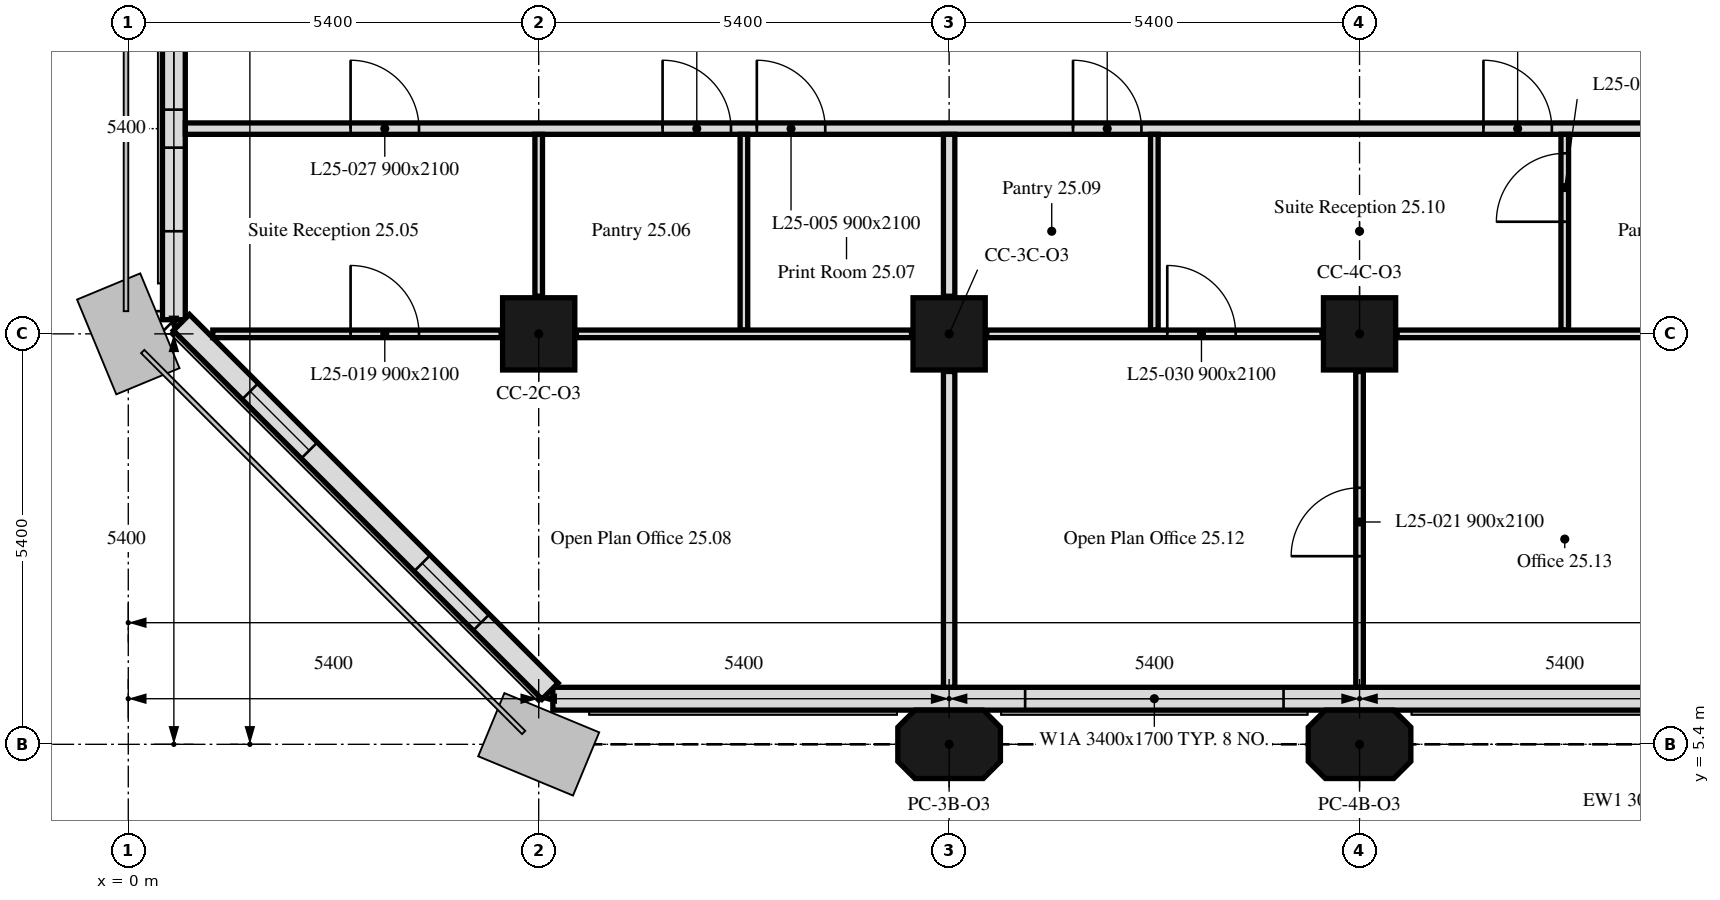
"""IFC4 building model, lengths in metres.
Left out: names, types, materials, properties, quantities, classifications, styles, units other than length and angle.
Written with IfcOpenShell. Run it as: python <this file> out.ifc"""

import sys

from ifc_helpers import new_model, si_unit, direction, frame, frame_2d, origin, origin_2d, place, context, subcontext, project, spatial, polyline, rectangle, outline, extrude, element, fill, save


model = new_model("IFC4")
c1 = context("Model", 3, precision=1e-05, world=origin(), true_north=direction((0.0, 1.0)))
c2 = subcontext(c1, "Body", "Model", "MODEL_VIEW")
j1 = project(units=[si_unit("LENGTHUNIT", "METRE"), si_unit("PLANEANGLEUNIT", "RADIAN")], contexts=[c1])
p1 = place(None, origin())
s1 = spatial("IfcSite", under=j1, at=p1, CompositionType="ELEMENT")
p2 = place(p1, origin())
s2 = spatial("IfcBuilding", under=s1, at=p2, CompositionType="ELEMENT")
p3 = place(p2, frame((0.0, 0.0, 106.8)))
s3 = spatial("IfcBuildingStorey", under=s2, at=p3, CompositionType="ELEMENT", Elevation=106.8)
for number, where, z_axis, x_axis in (
    (1, (10.8, 5.4, 0.0), (0.0, 0.0, 1.0), (1.0, 0.0, 0.0)),
    (2, (16.2, 5.4, 0.0), (0.0, 0.0, 1.0), (1.0, 0.0, 0.0)),
):
    element("IfcColumn", number, at=place(p3, frame(where, z_axis=z_axis, x_axis=x_axis)), inside=s3, PredefinedType="COLUMN", context=c2, shape_type="SweptSolid", body=[
        extrude(outline(polyline([(-0.45, -0.45), (0.45, -0.45), (0.675, -0.225), (0.675, 0.225), (0.45, 0.45), (-0.45, 0.45), (-0.675, 0.225), (-0.675, -0.225), (-0.45, -0.45)])), origin(), (0.0, 0.0, 1.0), 3.5),
    ])
for number, where, z_axis, x_axis in (
    (3, (5.4, 10.8, 0.0), (0.0, 0.0, 1.0), (1.0, 0.0, 0.0)),
    (4, (10.8, 10.8, 0.0), (0.0, 0.0, 1.0), (1.0, 0.0, 0.0)),
    (5, (16.2, 10.8, 0.0), (0.0, 0.0, 1.0), (1.0, 0.0, 0.0)),
):
    element("IfcColumn", number, at=place(p3, frame(where, z_axis=z_axis, x_axis=x_axis)), inside=s3, PredefinedType="COLUMN", context=c2, shape_type="SweptSolid", body=[
        extrude(rectangle(XDim=0.95, YDim=0.95, at=origin_2d()), origin(), (0.0, 0.0, 1.0), 3.5),
    ])
p4 = place(p3, frame((5.586, 6.0, 0.0), z_axis=(0.0, 0.0, 1.0), x_axis=(1.0, 0.0, 0.0)))
e6 = element("IfcWall", 6, at=p4, inside=s3, PredefinedType="SOLIDWALL", context=c2, shape_type="SweptSolid", body=[
    extrude(rectangle(XDim=32.027, YDim=0.3, at=frame_2d((16.014, 0.0))), origin(), (0.0, 0.0, 1.0), 3.5),
])
p5 = place(p4, frame((6.214, 0.0, 0.9)))
e7 = element("IfcOpeningElement", 7, at=p5, cuts=e6, PredefinedType="OPENING", context=c2, shape_type="SweptSolid", body=[
    extrude(rectangle(XDim=3.4, YDim=1.7, at=frame_2d((1.7, 0.85))), frame((0.0, 0.16, 0.0), z_axis=(0.0, -1.0, 0.0), x_axis=(1.0, 0.0, 0.0)), (0.0, 0.0, 1.0), 0.32),
])
p6 = place(p4, frame((17.014, 0.0, 0.9)))
e8 = element("IfcOpeningElement", 8, at=p6, cuts=e6, PredefinedType="OPENING", context=c2, shape_type="SweptSolid", body=[
    extrude(rectangle(XDim=3.4, YDim=1.7, at=frame_2d((1.7, 0.85))), frame((0.0, 0.16, 0.0), z_axis=(0.0, -1.0, 0.0), x_axis=(1.0, 0.0, 0.0)), (0.0, 0.0, 1.0), 0.32),
])
p7 = place(p4, frame((27.814, 0.0, 0.9)))
e9 = element("IfcOpeningElement", 9, at=p7, cuts=e6, PredefinedType="OPENING", context=c2, shape_type="SweptSolid", body=[
    extrude(rectangle(XDim=3.4, YDim=1.7, at=frame_2d((1.7, 0.85))), frame((0.0, 0.16, 0.0), z_axis=(0.0, -1.0, 0.0), x_axis=(1.0, 0.0, 0.0)), (0.0, 0.0, 1.0), 0.32),
])
p8 = place(p3, frame((0.6, 43.014, 0.0), z_axis=(0.0, 0.0, 1.0), x_axis=(0.0, -1.0, 0.0)))
e10 = element("IfcWall", 10, at=p8, inside=s3, PredefinedType="SOLIDWALL", context=c2, shape_type="SweptSolid", body=[
    extrude(rectangle(XDim=32.027, YDim=0.3, at=frame_2d((16.014, 0.0))), origin(), (0.0, 0.0, 1.0), 3.5),
])
p9 = place(p8, frame((6.564, 0.0, 0.9)))
e11 = element("IfcOpeningElement", 11, at=p9, cuts=e10, PredefinedType="OPENING", context=c2, shape_type="SweptSolid", body=[
    extrude(rectangle(XDim=1.1, YDim=1.7, at=frame_2d((0.55, 0.85))), frame((0.0, 0.16, 0.0), z_axis=(0.0, -1.0, 0.0), x_axis=(1.0, 0.0, 0.0)), (0.0, 0.0, 1.0), 0.32),
])
p10 = place(p8, frame((8.164, 0.0, 0.9)))
e12 = element("IfcOpeningElement", 12, at=p10, cuts=e10, PredefinedType="OPENING", context=c2, shape_type="SweptSolid", body=[
    extrude(rectangle(XDim=1.1, YDim=1.7, at=frame_2d((0.55, 0.85))), frame((0.0, 0.16, 0.0), z_axis=(0.0, -1.0, 0.0), x_axis=(1.0, 0.0, 0.0)), (0.0, 0.0, 1.0), 0.32),
])
p11 = place(p8, frame((17.014, 0.0, 0.9)))
e13 = element("IfcOpeningElement", 13, at=p11, cuts=e10, PredefinedType="OPENING", context=c2, shape_type="SweptSolid", body=[
    extrude(rectangle(XDim=3.4, YDim=1.7, at=frame_2d((1.7, 0.85))), frame((0.0, 0.16, 0.0), z_axis=(0.0, -1.0, 0.0), x_axis=(1.0, 0.0, 0.0)), (0.0, 0.0, 1.0), 0.32),
])
p12 = place(p8, frame((28.164, 0.0, 0.9)))
e14 = element("IfcOpeningElement", 14, at=p12, cuts=e10, PredefinedType="OPENING", context=c2, shape_type="SweptSolid", body=[
    extrude(rectangle(XDim=1.1, YDim=1.7, at=frame_2d((0.55, 0.85))), frame((0.0, 0.16, 0.0), z_axis=(0.0, -1.0, 0.0), x_axis=(1.0, 0.0, 0.0)), (0.0, 0.0, 1.0), 0.32),
])
p13 = place(p8, frame((29.764, 0.0, 0.9)))
e15 = element("IfcOpeningElement", 15, at=p13, cuts=e10, PredefinedType="OPENING", context=c2, shape_type="SweptSolid", body=[
    extrude(rectangle(XDim=1.1, YDim=1.7, at=frame_2d((0.55, 0.85))), frame((0.0, 0.16, 0.0), z_axis=(0.0, -1.0, 0.0), x_axis=(1.0, 0.0, 0.0)), (0.0, 0.0, 1.0), 0.32),
])
p14 = place(p3, frame((0.699, 10.949, 0.0), z_axis=(0.0, 0.0, 1.0), x_axis=(0.707106781187, -0.707106781187, 0.0)))
e16 = element("IfcWall", 16, at=p14, inside=s3, PredefinedType="SOLIDWALL", context=c2, shape_type="SweptSolid", body=[
    extrude(rectangle(XDim=6.86, YDim=0.3, at=frame_2d((3.43, 0.0))), origin(), (0.0, 0.0, 1.0), 3.5),
])
p15 = place(p14, frame((1.28, 0.0, 0.9)))
e17 = element("IfcOpeningElement", 17, at=p15, cuts=e16, PredefinedType="OPENING", context=c2, shape_type="SweptSolid", body=[
    extrude(rectangle(XDim=1.1, YDim=1.7, at=frame_2d((0.55, 0.85))), frame((0.0, 0.16, 0.0), z_axis=(0.0, -1.0, 0.0), x_axis=(1.0, 0.0, 0.0)), (0.0, 0.0, 1.0), 0.32),
])
p16 = place(p14, frame((4.48, 0.0, 0.9)))
e18 = element("IfcOpeningElement", 18, at=p16, cuts=e16, PredefinedType="OPENING", context=c2, shape_type="SweptSolid", body=[
    extrude(rectangle(XDim=1.1, YDim=1.7, at=frame_2d((0.55, 0.85))), frame((0.0, 0.16, 0.0), z_axis=(0.0, -1.0, 0.0), x_axis=(1.0, 0.0, 0.0)), (0.0, 0.0, 1.0), 0.32),
])
p17 = place(p3, frame((0.751, 13.5, 0.0), z_axis=(0.0, 0.0, 1.0), x_axis=(1.0, 0.0, 0.0)))
e19 = element("IfcWall", 19, at=p17, inside=s3, PredefinedType="PARTITIONING", context=c2, shape_type="SweptSolid", body=[
    extrude(rectangle(XDim=41.698, YDim=0.15, at=frame_2d((20.849, 0.0))), origin(), (0.0, 0.0, 1.0), 3.5),
])
p18 = place(p17, frame((6.279, 0.0, 0.0)))
e20 = element("IfcOpeningElement", 20, at=p18, cuts=e19, PredefinedType="OPENING", context=c2, shape_type="SweptSolid", body=[
    extrude(rectangle(XDim=0.9, YDim=2.1, at=frame_2d((0.45, 1.05))), frame((0.0, 0.075, 0.0), z_axis=(0.0, -1.0, 0.0), x_axis=(1.0, 0.0, 0.0)), (0.0, 0.0, 1.0), 0.15),
])
p19 = place(p17, frame((7.519, 0.0, 0.0)))
e21 = element("IfcOpeningElement", 21, at=p19, cuts=e19, PredefinedType="OPENING", context=c2, shape_type="SweptSolid", body=[
    extrude(rectangle(XDim=0.9, YDim=2.1, at=frame_2d((0.45, 1.05))), frame((0.0, 0.075, 0.0), z_axis=(0.0, -1.0, 0.0), x_axis=(1.0, 0.0, 0.0)), (0.0, 0.0, 1.0), 0.15),
])
p20 = place(p17, frame((11.679, 0.0, 0.0)))
e22 = element("IfcOpeningElement", 22, at=p20, cuts=e19, PredefinedType="OPENING", context=c2, shape_type="SweptSolid", body=[
    extrude(rectangle(XDim=0.9, YDim=2.1, at=frame_2d((0.45, 1.05))), frame((0.0, 0.075, 0.0), z_axis=(0.0, -1.0, 0.0), x_axis=(1.0, 0.0, 0.0)), (0.0, 0.0, 1.0), 0.15),
])
p21 = place(p17, frame((22.479, 0.0, 0.0)))
e23 = element("IfcOpeningElement", 23, at=p21, cuts=e19, PredefinedType="OPENING", context=c2, shape_type="SweptSolid", body=[
    extrude(rectangle(XDim=0.9, YDim=2.1, at=frame_2d((0.45, 1.05))), frame((0.0, 0.075, 0.0), z_axis=(0.0, -1.0, 0.0), x_axis=(1.0, 0.0, 0.0)), (0.0, 0.0, 1.0), 0.15),
])
p22 = place(p17, frame((23.719, 0.0, 0.0)))
e24 = element("IfcOpeningElement", 24, at=p22, cuts=e19, PredefinedType="OPENING", context=c2, shape_type="SweptSolid", body=[
    extrude(rectangle(XDim=0.9, YDim=2.1, at=frame_2d((0.45, 1.05))), frame((0.0, 0.075, 0.0), z_axis=(0.0, -1.0, 0.0), x_axis=(1.0, 0.0, 0.0)), (0.0, 0.0, 1.0), 0.15),
])
p23 = place(p17, frame((2.174, 0.0, 0.0)))
e25 = element("IfcOpeningElement", 25, at=p23, cuts=e19, PredefinedType="OPENING", context=c2, shape_type="SweptSolid", body=[
    extrude(rectangle(XDim=0.9, YDim=2.1, at=frame_2d((0.45, 1.05))), frame((0.0, 0.075, 0.0), z_axis=(0.0, -1.0, 0.0), x_axis=(1.0, 0.0, 0.0)), (0.0, 0.0, 1.0), 0.15),
])
p24 = place(p17, frame((17.079, 0.0, 0.0)))
e26 = element("IfcOpeningElement", 26, at=p24, cuts=e19, PredefinedType="OPENING", context=c2, shape_type="SweptSolid", body=[
    extrude(rectangle(XDim=0.9, YDim=2.1, at=frame_2d((0.45, 1.05))), frame((0.0, 0.075, 0.0), z_axis=(0.0, -1.0, 0.0), x_axis=(1.0, 0.0, 0.0)), (0.0, 0.0, 1.0), 0.15),
])
p25 = place(p17, frame((34.519, 0.0, 0.0)))
e27 = element("IfcOpeningElement", 27, at=p25, cuts=e19, PredefinedType="OPENING", context=c2, shape_type="SweptSolid", body=[
    extrude(rectangle(XDim=0.9, YDim=2.1, at=frame_2d((0.45, 1.05))), frame((0.0, 0.075, 0.0), z_axis=(0.0, -1.0, 0.0), x_axis=(1.0, 0.0, 0.0)), (0.0, 0.0, 1.0), 0.15),
])
p26 = place(p3, frame((1.112, 10.8, 0.0), z_axis=(0.0, 0.0, 1.0), x_axis=(1.0, 0.0, 0.0)))
e28 = element("IfcWall", 28, at=p26, inside=s3, PredefinedType="PARTITIONING", context=c2, shape_type="SweptSolid", body=[
    extrude(rectangle(XDim=3.793, YDim=0.1, at=frame_2d((1.896, 0.0))), origin(), (0.0, 0.0, 1.0), 3.5),
])
p27 = place(p26, frame((1.813, 0.0, 0.0)))
e29 = element("IfcOpeningElement", 29, at=p27, cuts=e28, PredefinedType="OPENING", context=c2, shape_type="SweptSolid", body=[
    extrude(rectangle(XDim=0.9, YDim=2.1, at=frame_2d((0.45, 1.05))), frame((0.0, 0.05, 0.0), z_axis=(0.0, -1.0, 0.0), x_axis=(1.0, 0.0, 0.0)), (0.0, 0.0, 1.0), 0.1),
])
p28 = place(p3, frame((5.4, 11.295, 0.0), z_axis=(0.0, 0.0, 1.0), x_axis=(0.0, 1.0, 0.0)))
e30 = element("IfcWall", 30, at=p28, inside=s3, PredefinedType="PARTITIONING", context=c2, shape_type="SweptSolid", body=[
    extrude(rectangle(XDim=2.13, YDim=0.1, at=frame_2d((1.065, 0.0))), origin(), (0.0, 0.0, 1.0), 3.5),
])
p29 = place(p3, frame((8.1, 10.85, 0.0), z_axis=(0.0, 0.0, 1.0), x_axis=(0.0, 1.0, 0.0)))
e31 = element("IfcWall", 31, at=p29, inside=s3, PredefinedType="PARTITIONING", context=c2, shape_type="SweptSolid", body=[
    extrude(rectangle(XDim=2.575, YDim=0.1, at=frame_2d((1.288, 0.0))), origin(), (0.0, 0.0, 1.0), 3.5),
])
p30 = place(p3, frame((5.895, 10.8, 0.0), z_axis=(0.0, 0.0, 1.0), x_axis=(1.0, 0.0, 0.0)))
e32 = element("IfcWall", 32, at=p30, inside=s3, PredefinedType="PARTITIONING", context=c2, shape_type="SweptSolid", body=[
    extrude(rectangle(XDim=4.41, YDim=0.1, at=frame_2d((2.205, 0.0))), origin(), (0.0, 0.0, 1.0), 3.5),
])
p31 = place(p3, frame((10.8, 11.295, 0.0), z_axis=(0.0, 0.0, 1.0), x_axis=(0.0, 1.0, 0.0)))
e33 = element("IfcWall", 33, at=p31, inside=s3, PredefinedType="PARTITIONING", context=c2, shape_type="SweptSolid", body=[
    extrude(rectangle(XDim=2.13, YDim=0.15, at=frame_2d((1.065, 0.0))), origin(), (0.0, 0.0, 1.0), 3.5),
])
p32 = place(p3, frame((10.8, 6.151, 0.0), z_axis=(0.0, 0.0, 1.0), x_axis=(0.0, 1.0, 0.0)))
e34 = element("IfcWall", 34, at=p32, inside=s3, PredefinedType="PARTITIONING", context=c2, shape_type="SweptSolid", body=[
    extrude(rectangle(XDim=4.154, YDim=0.15, at=frame_2d((2.077, 0.0))), origin(), (0.0, 0.0, 1.0), 3.5),
])
p33 = place(p3, frame((13.5, 10.85, 0.0), z_axis=(0.0, 0.0, 1.0), x_axis=(0.0, 1.0, 0.0)))
e35 = element("IfcWall", 35, at=p33, inside=s3, PredefinedType="PARTITIONING", context=c2, shape_type="SweptSolid", body=[
    extrude(rectangle(XDim=2.575, YDim=0.1, at=frame_2d((1.288, 0.0))), origin(), (0.0, 0.0, 1.0), 3.5),
])
p34 = place(p3, frame((11.295, 10.8, 0.0), z_axis=(0.0, 0.0, 1.0), x_axis=(1.0, 0.0, 0.0)))
e36 = element("IfcWall", 36, at=p34, inside=s3, PredefinedType="PARTITIONING", context=c2, shape_type="SweptSolid", body=[
    extrude(rectangle(XDim=4.41, YDim=0.1, at=frame_2d((2.205, 0.0))), origin(), (0.0, 0.0, 1.0), 3.5),
])
p35 = place(p34, frame((2.375, 0.0, 0.0)))
e37 = element("IfcOpeningElement", 37, at=p35, cuts=e36, PredefinedType="OPENING", context=c2, shape_type="SweptSolid", body=[
    extrude(rectangle(XDim=0.9, YDim=2.1, at=frame_2d((0.45, 1.05))), frame((0.0, 0.05, 0.0), z_axis=(0.0, -1.0, 0.0), x_axis=(1.0, 0.0, 0.0)), (0.0, 0.0, 1.0), 0.1),
])
p36 = place(p3, frame((18.9, 10.85, 0.0), z_axis=(0.0, 0.0, 1.0), x_axis=(0.0, 1.0, 0.0)))
e38 = element("IfcWall", 38, at=p36, inside=s3, PredefinedType="PARTITIONING", context=c2, shape_type="SweptSolid", body=[
    extrude(rectangle(XDim=2.575, YDim=0.1, at=frame_2d((1.288, 0.0))), origin(), (0.0, 0.0, 1.0), 3.5),
])
p37 = place(p36, frame((1.425, 0.0, 0.0)))
e39 = element("IfcOpeningElement", 39, at=p37, cuts=e38, PredefinedType="OPENING", context=c2, shape_type="SweptSolid", body=[
    extrude(rectangle(XDim=0.9, YDim=2.1, at=frame_2d((0.45, 1.05))), frame((0.0, 0.05, 0.0), z_axis=(0.0, -1.0, 0.0), x_axis=(1.0, 0.0, 0.0)), (0.0, 0.0, 1.0), 0.1),
])
p38 = place(p3, frame((16.695, 10.8, 0.0), z_axis=(0.0, 0.0, 1.0), x_axis=(1.0, 0.0, 0.0)))
e40 = element("IfcWall", 40, at=p38, inside=s3, PredefinedType="PARTITIONING", context=c2, shape_type="SweptSolid", body=[
    extrude(rectangle(XDim=4.41, YDim=0.1, at=frame_2d((2.205, 0.0))), origin(), (0.0, 0.0, 1.0), 3.5),
])
p39 = place(p3, frame((16.2, 6.151, 0.0), z_axis=(0.0, 0.0, 1.0), x_axis=(0.0, 1.0, 0.0)))
e41 = element("IfcWall", 41, at=p39, inside=s3, PredefinedType="PARTITIONING", context=c2, shape_type="SweptSolid", body=[
    extrude(rectangle(XDim=4.154, YDim=0.1, at=frame_2d((2.077, 0.0))), origin(), (0.0, 0.0, 1.0), 3.5),
])
p40 = place(p39, frame((1.724, 0.0, 0.0)))
e42 = element("IfcOpeningElement", 42, at=p40, cuts=e41, PredefinedType="OPENING", context=c2, shape_type="SweptSolid", body=[
    extrude(rectangle(XDim=0.9, YDim=2.1, at=frame_2d((0.45, 1.05))), frame((0.0, 0.05, 0.0), z_axis=(0.0, -1.0, 0.0), x_axis=(1.0, 0.0, 0.0)), (0.0, 0.0, 1.0), 0.1),
])
p41 = place(p5, origin())
e43 = element("IfcWindow", 43, at=p41, inside=s3, PartitioningType="SINGLE_PANEL", PredefinedType="WINDOW", context=c2, shape_type="SweptSolid", body=[
    extrude(rectangle(XDim=3.4, YDim=1.7, at=frame_2d((1.7, 0.85))), frame((0.0, 0.03, 0.0), z_axis=(0.0, -1.0, 0.0), x_axis=(1.0, 0.0, 0.0)), (0.0, 0.0, 1.0), 0.06),
])
fill(e7, e43)
p42 = place(p12, origin())
e44 = element("IfcWindow", 44, at=p42, inside=s3, PartitioningType="SINGLE_PANEL", PredefinedType="WINDOW", context=c2, shape_type="SweptSolid", body=[
    extrude(rectangle(XDim=1.1, YDim=1.7, at=frame_2d((0.55, 0.85))), frame((0.0, 0.03, 0.0), z_axis=(0.0, -1.0, 0.0), x_axis=(1.0, 0.0, 0.0)), (0.0, 0.0, 1.0), 0.06),
])
fill(e14, e44)
p43 = place(p13, origin())
e45 = element("IfcWindow", 45, at=p43, inside=s3, PartitioningType="SINGLE_PANEL", PredefinedType="WINDOW", context=c2, shape_type="SweptSolid", body=[
    extrude(rectangle(XDim=1.1, YDim=1.7, at=frame_2d((0.55, 0.85))), frame((0.0, 0.03, 0.0), z_axis=(0.0, -1.0, 0.0), x_axis=(1.0, 0.0, 0.0)), (0.0, 0.0, 1.0), 0.06),
])
fill(e15, e45)
p44 = place(p15, origin())
e46 = element("IfcWindow", 46, at=p44, inside=s3, PartitioningType="SINGLE_PANEL", PredefinedType="WINDOW", context=c2, shape_type="SweptSolid", body=[
    extrude(rectangle(XDim=1.1, YDim=1.7, at=frame_2d((0.55, 0.85))), frame((0.0, 0.03, 0.0), z_axis=(0.0, -1.0, 0.0), x_axis=(1.0, 0.0, 0.0)), (0.0, 0.0, 1.0), 0.06),
])
fill(e17, e46)
p45 = place(p16, origin())
e47 = element("IfcWindow", 47, at=p45, inside=s3, PartitioningType="SINGLE_PANEL", PredefinedType="WINDOW", context=c2, shape_type="SweptSolid", body=[
    extrude(rectangle(XDim=1.1, YDim=1.7, at=frame_2d((0.55, 0.85))), frame((0.0, 0.03, 0.0), z_axis=(0.0, -1.0, 0.0), x_axis=(1.0, 0.0, 0.0)), (0.0, 0.0, 1.0), 0.06),
])
fill(e18, e47)
p46 = place(p18, origin())
e48 = element("IfcDoor", 48, at=p46, inside=s3, OperationType="SINGLE_SWING_LEFT", PredefinedType="DOOR", context=c2, shape_type="SweptSolid", body=[
    extrude(rectangle(XDim=0.9, YDim=2.1, at=frame_2d((0.45, 1.05))), frame((0.0, 0.025, 0.0), z_axis=(0.0, -1.0, 0.0), x_axis=(1.0, 0.0, 0.0)), (0.0, 0.0, 1.0), 0.05),
])
fill(e20, e48)
p47 = place(p19, origin())
e49 = element("IfcDoor", 49, at=p47, inside=s3, OperationType="SINGLE_SWING_LEFT", PredefinedType="DOOR", context=c2, shape_type="SweptSolid", body=[
    extrude(rectangle(XDim=0.9, YDim=2.1, at=frame_2d((0.45, 1.05))), frame((0.0, 0.025, 0.0), z_axis=(0.0, -1.0, 0.0), x_axis=(1.0, 0.0, 0.0)), (0.0, 0.0, 1.0), 0.05),
])
fill(e21, e49)
p48 = place(p20, origin())
e50 = element("IfcDoor", 50, at=p48, inside=s3, OperationType="SINGLE_SWING_LEFT", PredefinedType="DOOR", context=c2, shape_type="SweptSolid", body=[
    extrude(rectangle(XDim=0.9, YDim=2.1, at=frame_2d((0.45, 1.05))), frame((0.0, 0.025, 0.0), z_axis=(0.0, -1.0, 0.0), x_axis=(1.0, 0.0, 0.0)), (0.0, 0.0, 1.0), 0.05),
])
fill(e22, e50)
p49 = place(p27, origin())
e51 = element("IfcDoor", 51, at=p49, inside=s3, OperationType="SINGLE_SWING_RIGHT", PredefinedType="DOOR", context=c2, shape_type="SweptSolid", body=[
    extrude(rectangle(XDim=0.9, YDim=2.1, at=frame_2d((0.45, 1.05))), frame((0.0, 0.025, 0.0), z_axis=(0.0, -1.0, 0.0), x_axis=(1.0, 0.0, 0.0)), (0.0, 0.0, 1.0), 0.05),
])
fill(e29, e51)
p50 = place(p37, origin())
e52 = element("IfcDoor", 52, at=p50, inside=s3, OperationType="SINGLE_SWING_RIGHT", PredefinedType="DOOR", context=c2, shape_type="SweptSolid", body=[
    extrude(rectangle(XDim=0.9, YDim=2.1, at=frame_2d((0.45, 1.05))), frame((0.0, 0.025, 0.0), z_axis=(0.0, -1.0, 0.0), x_axis=(1.0, 0.0, 0.0)), (0.0, 0.0, 1.0), 0.05),
])
fill(e39, e52)
p51 = place(p40, origin())
e53 = element("IfcDoor", 53, at=p51, inside=s3, OperationType="SINGLE_SWING_RIGHT", PredefinedType="DOOR", context=c2, shape_type="SweptSolid", body=[
    extrude(rectangle(XDim=0.9, YDim=2.1, at=frame_2d((0.45, 1.05))), frame((0.0, 0.025, 0.0), z_axis=(0.0, -1.0, 0.0), x_axis=(1.0, 0.0, 0.0)), (0.0, 0.0, 1.0), 0.05),
])
fill(e42, e53)
p52 = place(p23, origin())
e54 = element("IfcDoor", 54, at=p52, inside=s3, OperationType="SINGLE_SWING_LEFT", PredefinedType="DOOR", context=c2, shape_type="SweptSolid", body=[
    extrude(rectangle(XDim=0.9, YDim=2.1, at=frame_2d((0.45, 1.05))), frame((0.0, 0.025, 0.0), z_axis=(0.0, -1.0, 0.0), x_axis=(1.0, 0.0, 0.0)), (0.0, 0.0, 1.0), 0.05),
])
fill(e25, e54)
p53 = place(p35, origin())
e55 = element("IfcDoor", 55, at=p53, inside=s3, OperationType="SINGLE_SWING_LEFT", PredefinedType="DOOR", context=c2, shape_type="SweptSolid", body=[
    extrude(rectangle(XDim=0.9, YDim=2.1, at=frame_2d((0.45, 1.05))), frame((0.0, 0.025, 0.0), z_axis=(0.0, -1.0, 0.0), x_axis=(1.0, 0.0, 0.0)), (0.0, 0.0, 1.0), 0.05),
])
fill(e37, e55)
p54 = place(p24, origin())
e56 = element("IfcDoor", 56, at=p54, inside=s3, OperationType="SINGLE_SWING_LEFT", PredefinedType="DOOR", context=c2, shape_type="SweptSolid", body=[
    extrude(rectangle(XDim=0.9, YDim=2.1, at=frame_2d((0.45, 1.05))), frame((0.0, 0.025, 0.0), z_axis=(0.0, -1.0, 0.0), x_axis=(1.0, 0.0, 0.0)), (0.0, 0.0, 1.0), 0.05),
])
fill(e26, e56)
save(model, sys.argv[1])
